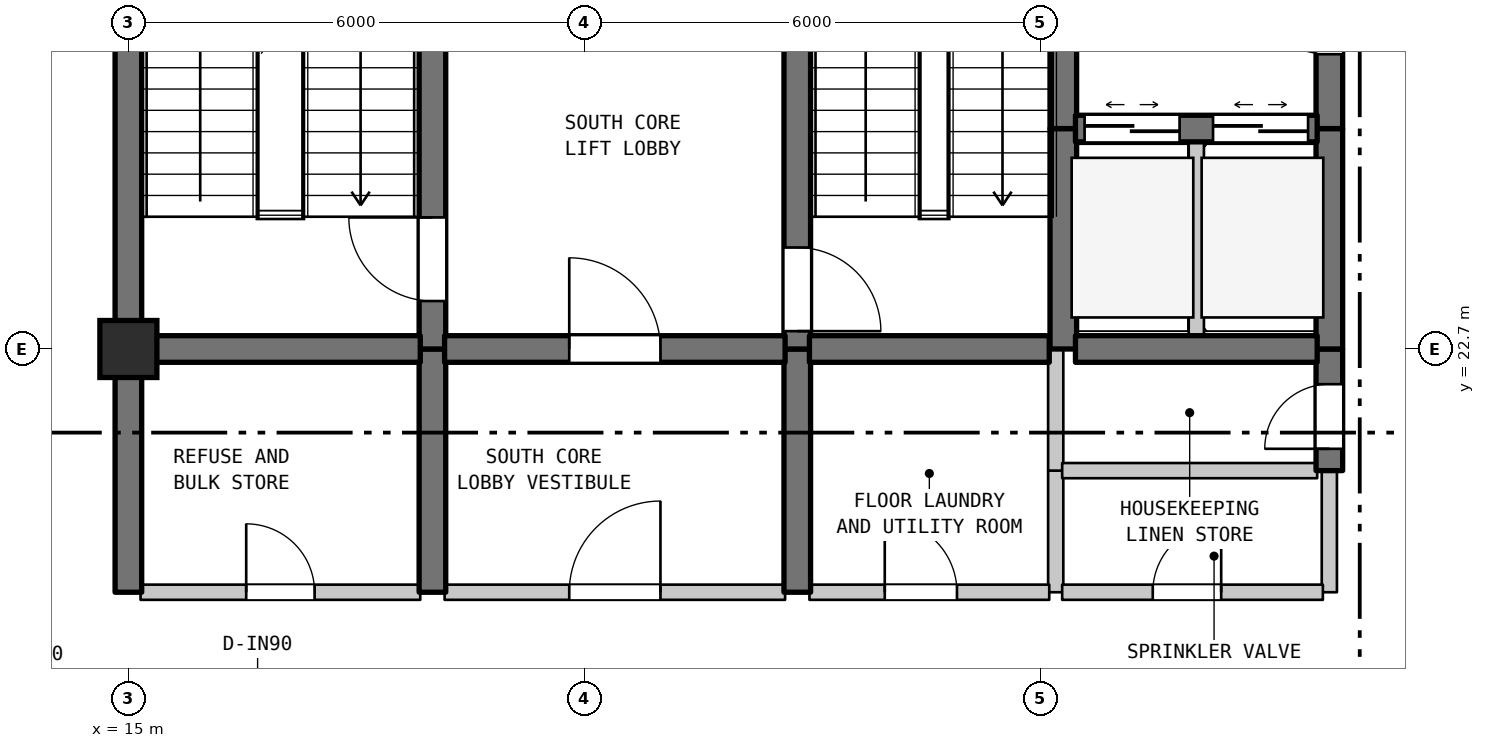
"""IFC4 building model, lengths in metres.
Left out: names, types, materials, properties, quantities, classifications, styles, units other than length and angle.
Written with IfcOpenShell. Run it as: python <this file> out.ifc"""

import sys

from ifc_helpers import new_model, si_unit, direction, frame, frame_2d, origin, origin_2d, place, context, subcontext, project, spatial, rectangle, extrude, element, fill, save


model = new_model("IFC4")
c1 = context("Model", 3, precision=1e-05, world=origin(), true_north=direction((0.0, 1.0)))
c2 = subcontext(c1, "Body", "Model", "MODEL_VIEW")
j1 = project(units=[si_unit("LENGTHUNIT", "METRE"), si_unit("PLANEANGLEUNIT", "RADIAN")], contexts=[c1])
p1 = place(None, origin())
s1 = spatial("IfcSite", under=j1, at=p1, CompositionType="ELEMENT")
p2 = place(p1, origin())
s2 = spatial("IfcBuilding", under=s1, at=p2, CompositionType="ELEMENT")
p3 = place(p2, frame((0.0, 0.0, 206.9)))
s3 = spatial("IfcBuildingStorey", under=s2, at=p3, CompositionType="ELEMENT", Elevation=206.9)
p4 = place(p3, frame((15.0, 22.7, 0.0), z_axis=(0.0, 0.0, 1.0), x_axis=(1.0, 0.0, 0.0)))
e1 = element("IfcColumn", 1, at=p4, inside=s3, PredefinedType="COLUMN", context=c2, shape_type="SweptSolid", body=[
    extrude(rectangle(XDim=0.75, YDim=0.75, at=origin_2d()), origin(), (0.0, 0.0, 1.0), 3.7),
])
p5 = place(p3, frame((15.0, 19.5, 0.0), z_axis=(0.0, 0.0, 1.0), x_axis=(0.0, 1.0, 0.0)))
e2 = element("IfcWall", 2, at=p5, inside=s3, PredefinedType="SHEAR", context=c2, shape_type="SweptSolid", body=[
    extrude(rectangle(XDim=3.2, YDim=0.35, at=frame_2d((1.6, 0.0))), origin(), (0.0, 0.0, 1.0), 3.39),
])
p6 = place(p3, frame((15.0, 22.7, 0.0), z_axis=(0.0, 0.0, 1.0), x_axis=(0.0, 1.0, 0.0)))
e3 = element("IfcWall", 3, at=p6, inside=s3, PredefinedType="SHEAR", context=c2, shape_type="SweptSolid", body=[
    extrude(rectangle(XDim=6.8, YDim=0.35, at=frame_2d((3.4, 0.0))), origin(), (0.0, 0.0, 1.0), 3.39),
])
p7 = place(p3, frame((19.0, 19.5, 0.0), z_axis=(0.0, 0.0, 1.0), x_axis=(0.0, 1.0, 0.0)))
e4 = element("IfcWall", 4, at=p7, inside=s3, PredefinedType="SHEAR", context=c2, shape_type="SweptSolid", body=[
    extrude(rectangle(XDim=3.2, YDim=0.35, at=frame_2d((1.6, 0.0))), origin(), (0.0, 0.0, 1.0), 3.39),
])
p8 = place(p3, frame((19.0, 22.7, 0.0), z_axis=(0.0, 0.0, 1.0), x_axis=(0.0, 1.0, 0.0)))
e5 = element("IfcWall", 5, at=p8, inside=s3, PredefinedType="SHEAR", context=c2, shape_type="SweptSolid", body=[
    extrude(rectangle(XDim=5.5, YDim=0.35, at=frame_2d((2.75, 0.0))), origin(), (0.0, 0.0, 1.0), 3.39),
])
p9 = place(p8, frame((0.631, 0.0, 0.0)))
e6 = element("IfcOpeningElement", 6, at=p9, cuts=e5, PredefinedType="OPENING", context=c2, shape_type="SweptSolid", body=[
    extrude(rectangle(XDim=1.1, YDim=2.15, at=frame_2d((0.55, 1.075))), frame((0.0, 0.185, 0.0), z_axis=(0.0, -1.0, 0.0), x_axis=(1.0, 0.0, 0.0)), (0.0, 0.0, 1.0), 0.37),
])
p10 = place(p3, frame((23.8, 19.5, 0.0), z_axis=(0.0, 0.0, 1.0), x_axis=(0.0, 1.0, 0.0)))
e7 = element("IfcWall", 7, at=p10, inside=s3, PredefinedType="SHEAR", context=c2, shape_type="SweptSolid", body=[
    extrude(rectangle(XDim=3.2, YDim=0.35, at=frame_2d((1.6, 0.0))), origin(), (0.0, 0.0, 1.0), 3.39),
])
p11 = place(p3, frame((23.8, 22.7, 0.0), z_axis=(0.0, 0.0, 1.0), x_axis=(0.0, 1.0, 0.0)))
e8 = element("IfcWall", 8, at=p11, inside=s3, PredefinedType="SHEAR", context=c2, shape_type="SweptSolid", body=[
    extrude(rectangle(XDim=5.5, YDim=0.35, at=frame_2d((2.75, 0.0))), origin(), (0.0, 0.0, 1.0), 3.39),
])
p12 = place(p11, frame((0.235, 0.0, 0.0)))
e9 = element("IfcOpeningElement", 9, at=p12, cuts=e8, PredefinedType="OPENING", context=c2, shape_type="SweptSolid", body=[
    extrude(rectangle(XDim=1.1, YDim=2.15, at=frame_2d((0.55, 1.075))), frame((0.0, 0.185, 0.0), z_axis=(0.0, -1.0, 0.0), x_axis=(1.0, 0.0, 0.0)), (0.0, 0.0, 1.0), 0.37),
])
p13 = place(p3, frame((27.2, 19.5, 0.0), z_axis=(0.0, 0.0, 1.0), x_axis=(0.0, 1.0, 0.0)))
e10 = element("IfcWall", 10, at=p13, inside=s3, PredefinedType="STANDARD", context=c2, shape_type="SweptSolid", body=[
    extrude(rectangle(XDim=1.6, YDim=0.2, at=frame_2d((0.8, 0.0))), origin(), (0.0, 0.0, 1.0), 3.39),
])
p14 = place(p3, frame((27.2, 21.1, 0.0), z_axis=(0.0, 0.0, 1.0), x_axis=(0.0, 1.0, 0.0)))
e11 = element("IfcWall", 11, at=p14, inside=s3, PredefinedType="STANDARD", context=c2, shape_type="SweptSolid", body=[
    extrude(rectangle(XDim=1.6, YDim=0.2, at=frame_2d((0.8, 0.0))), origin(), (0.0, 0.0, 1.0), 3.39),
])
p15 = place(p3, frame((27.3, 22.7, 0.0), z_axis=(0.0, 0.0, 1.0), x_axis=(0.0, 1.0, 0.0)))
e12 = element("IfcWall", 12, at=p15, inside=s3, PredefinedType="SHEAR", context=c2, shape_type="SweptSolid", body=[
    extrude(rectangle(XDim=2.9, YDim=0.35, at=frame_2d((1.45, 0.0))), origin(), (0.0, 0.0, 1.0), 3.39),
])
p16 = place(p3, frame((27.3, 25.6, 0.0), z_axis=(0.0, 0.0, 1.0), x_axis=(0.0, 1.0, 0.0)))
e13 = element("IfcWall", 13, at=p16, inside=s3, PredefinedType="SHEAR", context=c2, shape_type="SweptSolid", body=[
    extrude(rectangle(XDim=3.3, YDim=0.35, at=frame_2d((1.65, 0.0))), origin(), (0.0, 0.0, 1.0), 3.39),
])
p17 = place(p3, frame((29.05, 22.7, 0.0), z_axis=(0.0, 0.0, 1.0), x_axis=(0.0, 1.0, 0.0)))
e14 = element("IfcWall", 14, at=p17, inside=s3, PredefinedType="STANDARD", context=c2, shape_type="SweptSolid", body=[
    extrude(rectangle(XDim=2.9, YDim=0.2, at=frame_2d((1.45, 0.0))), origin(), (0.0, 0.0, 1.0), 3.39),
])
p18 = place(p3, frame((30.8, 19.5, 0.0), z_axis=(0.0, 0.0, 1.0), x_axis=(0.0, 1.0, 0.0)))
e15 = element("IfcWall", 15, at=p18, inside=s3, PredefinedType="STANDARD", context=c2, shape_type="SweptSolid", body=[
    extrude(rectangle(XDim=1.6, YDim=0.2, at=frame_2d((0.8, 0.0))), origin(), (0.0, 0.0, 1.0), 3.39),
])
p19 = place(p3, frame((30.8, 21.1, 0.0), z_axis=(0.0, 0.0, 1.0), x_axis=(0.0, 1.0, 0.0)))
e16 = element("IfcWall", 16, at=p19, inside=s3, PredefinedType="SHEAR", context=c2, shape_type="SweptSolid", body=[
    extrude(rectangle(XDim=1.6, YDim=0.35, at=frame_2d((0.8, 0.0))), origin(), (0.0, 0.0, 1.0), 3.39),
])
p20 = place(p19, frame((0.287, 0.0, 0.0)))
e17 = element("IfcOpeningElement", 17, at=p20, cuts=e16, PredefinedType="OPENING", context=c2, shape_type="SweptSolid", body=[
    extrude(rectangle(XDim=0.85, YDim=2.1, at=frame_2d((0.425, 1.05))), frame((0.0, 0.185, 0.0), z_axis=(0.0, -1.0, 0.0), x_axis=(1.0, 0.0, 0.0)), (0.0, 0.0, 1.0), 0.37),
])
p21 = place(p3, frame((30.8, 22.7, 0.0), z_axis=(0.0, 0.0, 1.0), x_axis=(0.0, 1.0, 0.0)))
e18 = element("IfcWall", 18, at=p21, inside=s3, PredefinedType="SHEAR", context=c2, shape_type="SweptSolid", body=[
    extrude(rectangle(XDim=2.9, YDim=0.35, at=frame_2d((1.45, 0.0))), origin(), (0.0, 0.0, 1.0), 3.39),
])
p22 = place(p3, frame((30.8, 25.6, 0.0), z_axis=(0.0, 0.0, 1.0), x_axis=(0.0, 1.0, 0.0)))
e19 = element("IfcWall", 19, at=p22, inside=s3, PredefinedType="SHEAR", context=c2, shape_type="SweptSolid", body=[
    extrude(rectangle(XDim=3.3, YDim=0.35, at=frame_2d((1.65, 0.0))), origin(), (0.0, 0.0, 1.0), 3.39),
])
p23 = place(p22, frame((0.978, 0.0, 0.0)))
e20 = element("IfcOpeningElement", 20, at=p23, cuts=e19, PredefinedType="OPENING", context=c2, shape_type="SweptSolid", body=[
    extrude(rectangle(XDim=1.2, YDim=2.2, at=frame_2d((0.6, 1.1))), frame((0.0, 0.185, 0.0), z_axis=(0.0, -1.0, 0.0), x_axis=(1.0, 0.0, 0.0)), (0.0, 0.0, 1.0), 0.37),
])
p24 = place(p3, frame((15.16, 19.5, 0.0), z_axis=(0.0, 0.0, 1.0), x_axis=(1.0, 0.0, 0.0)))
e21 = element("IfcWall", 21, at=p24, inside=s3, PredefinedType="STANDARD", context=c2, shape_type="SweptSolid", body=[
    extrude(rectangle(XDim=3.68, YDim=0.2, at=frame_2d((1.84, 0.0))), origin(), (0.0, 0.0, 1.0), 3.39),
])
p25 = place(p24, frame((1.39, 0.0, 0.0)))
e22 = element("IfcOpeningElement", 22, at=p25, cuts=e21, PredefinedType="OPENING", context=c2, shape_type="SweptSolid", body=[
    extrude(rectangle(XDim=0.9, YDim=2.15, at=frame_2d((0.45, 1.075))), frame((0.0, 0.11, 0.0), z_axis=(0.0, -1.0, 0.0), x_axis=(1.0, 0.0, 0.0)), (0.0, 0.0, 1.0), 0.22),
])
p26 = place(p3, frame((19.16, 19.5, 0.0), z_axis=(0.0, 0.0, 1.0), x_axis=(1.0, 0.0, 0.0)))
e23 = element("IfcWall", 23, at=p26, inside=s3, PredefinedType="STANDARD", context=c2, shape_type="SweptSolid", body=[
    extrude(rectangle(XDim=4.48, YDim=0.2, at=frame_2d((2.24, 0.0))), origin(), (0.0, 0.0, 1.0), 3.39),
])
p27 = place(p26, frame((1.64, 0.0, 0.0)))
e24 = element("IfcOpeningElement", 24, at=p27, cuts=e23, PredefinedType="OPENING", context=c2, shape_type="SweptSolid", body=[
    extrude(rectangle(XDim=1.2, YDim=2.2, at=frame_2d((0.6, 1.1))), frame((0.0, 0.11, 0.0), z_axis=(0.0, -1.0, 0.0), x_axis=(1.0, 0.0, 0.0)), (0.0, 0.0, 1.0), 0.22),
])
p28 = place(p3, frame((23.96, 19.5, 0.0), z_axis=(0.0, 0.0, 1.0), x_axis=(1.0, 0.0, 0.0)))
e25 = element("IfcWall", 25, at=p28, inside=s3, PredefinedType="STANDARD", context=c2, shape_type="SweptSolid", body=[
    extrude(rectangle(XDim=3.155, YDim=0.2, at=frame_2d((1.578, 0.0))), origin(), (0.0, 0.0, 1.0), 3.39),
])
p29 = place(p28, frame((0.991, 0.0, 0.0)))
e26 = element("IfcOpeningElement", 26, at=p29, cuts=e25, PredefinedType="OPENING", context=c2, shape_type="SweptSolid", body=[
    extrude(rectangle(XDim=0.95, YDim=2.15, at=frame_2d((0.475, 1.075))), frame((0.0, 0.11, 0.0), z_axis=(0.0, -1.0, 0.0), x_axis=(1.0, 0.0, 0.0)), (0.0, 0.0, 1.0), 0.22),
])
p30 = place(p3, frame((27.285, 19.5, 0.0), z_axis=(0.0, 0.0, 1.0), x_axis=(1.0, 0.0, 0.0)))
e27 = element("IfcWall", 27, at=p30, inside=s3, PredefinedType="STANDARD", context=c2, shape_type="SweptSolid", body=[
    extrude(rectangle(XDim=3.43, YDim=0.2, at=frame_2d((1.715, 0.0))), origin(), (0.0, 0.0, 1.0), 3.39),
])
p31 = place(p30, frame((1.192, 0.0, 0.0)))
e28 = element("IfcOpeningElement", 28, at=p31, cuts=e27, PredefinedType="OPENING", context=c2, shape_type="SweptSolid", body=[
    extrude(rectangle(XDim=0.9, YDim=2.15, at=frame_2d((0.45, 1.075))), frame((0.0, 0.11, 0.0), z_axis=(0.0, -1.0, 0.0), x_axis=(1.0, 0.0, 0.0)), (0.0, 0.0, 1.0), 0.22),
])
p32 = place(p3, frame((27.285, 21.1, 0.0), z_axis=(0.0, 0.0, 1.0), x_axis=(1.0, 0.0, 0.0)))
e29 = element("IfcWall", 29, at=p32, inside=s3, PredefinedType="STANDARD", context=c2, shape_type="SweptSolid", body=[
    extrude(rectangle(XDim=3.355, YDim=0.2, at=frame_2d((1.677, 0.0))), origin(), (0.0, 0.0, 1.0), 3.39),
])
p33 = place(p3, frame((15.16, 22.7, 0.0), z_axis=(0.0, 0.0, 1.0), x_axis=(1.0, 0.0, 0.0)))
e30 = element("IfcWall", 30, at=p33, inside=s3, PredefinedType="SHEAR", context=c2, shape_type="SweptSolid", body=[
    extrude(rectangle(XDim=3.68, YDim=0.35, at=frame_2d((1.84, 0.0))), origin(), (0.0, 0.0, 1.0), 3.39),
])
p34 = place(p3, frame((19.16, 22.7, 0.0), z_axis=(0.0, 0.0, 1.0), x_axis=(1.0, 0.0, 0.0)))
e31 = element("IfcWall", 31, at=p34, inside=s3, PredefinedType="SHEAR", context=c2, shape_type="SweptSolid", body=[
    extrude(rectangle(XDim=4.48, YDim=0.35, at=frame_2d((2.24, 0.0))), origin(), (0.0, 0.0, 1.0), 3.39),
])
p35 = place(p34, frame((1.64, 0.0, 0.0)))
e32 = element("IfcOpeningElement", 32, at=p35, cuts=e31, PredefinedType="OPENING", context=c2, shape_type="SweptSolid", body=[
    extrude(rectangle(XDim=1.2, YDim=2.2, at=frame_2d((0.6, 1.1))), frame((0.0, 0.185, 0.0), z_axis=(0.0, -1.0, 0.0), x_axis=(1.0, 0.0, 0.0)), (0.0, 0.0, 1.0), 0.37),
])
p36 = place(p3, frame((23.96, 22.7, 0.0), z_axis=(0.0, 0.0, 1.0), x_axis=(1.0, 0.0, 0.0)))
e33 = element("IfcWall", 33, at=p36, inside=s3, PredefinedType="SHEAR", context=c2, shape_type="SweptSolid", body=[
    extrude(rectangle(XDim=3.155, YDim=0.35, at=frame_2d((1.578, 0.0))), origin(), (0.0, 0.0, 1.0), 3.39),
])
p37 = place(p3, frame((27.46, 22.7, 0.0), z_axis=(0.0, 0.0, 1.0), x_axis=(1.0, 0.0, 0.0)))
e34 = element("IfcWall", 34, at=p37, inside=s3, PredefinedType="SHEAR", context=c2, shape_type="SweptSolid", body=[
    extrude(rectangle(XDim=3.18, YDim=0.35, at=frame_2d((1.59, 0.0))), origin(), (0.0, 0.0, 1.0), 3.39),
])
p38 = place(p3, frame((27.46, 25.6, 0.0), z_axis=(0.0, 0.0, 1.0), x_axis=(1.0, 0.0, 0.0)))
e35 = element("IfcWall", 35, at=p38, inside=s3, PredefinedType="SHEAR", context=c2, shape_type="SweptSolid", body=[
    extrude(rectangle(XDim=3.18, YDim=0.35, at=frame_2d((1.59, 0.0))), origin(), (0.0, 0.0, 1.0), 3.39),
])
p39 = place(p38, frame((0.12, 0.0, 0.0)))
e36 = element("IfcOpeningElement", 36, at=p39, cuts=e35, PredefinedType="OPENING", context=c2, shape_type="SweptSolid", body=[
    extrude(rectangle(XDim=1.25, YDim=2.2, at=frame_2d((0.625, 1.1))), frame((0.0, 0.185, 0.0), z_axis=(0.0, -1.0, 0.0), x_axis=(1.0, 0.0, 0.0)), (0.0, 0.0, 1.0), 0.37),
])
p40 = place(p38, frame((1.81, 0.0, 0.0)))
e37 = element("IfcOpeningElement", 37, at=p40, cuts=e35, PredefinedType="OPENING", context=c2, shape_type="SweptSolid", body=[
    extrude(rectangle(XDim=1.25, YDim=2.2, at=frame_2d((0.625, 1.1))), frame((0.0, 0.185, 0.0), z_axis=(0.0, -1.0, 0.0), x_axis=(1.0, 0.0, 0.0)), (0.0, 0.0, 1.0), 0.37),
])
p41 = place(p9, origin())
e38 = element("IfcDoor", 38, at=p41, inside=s3, OperationType="SINGLE_SWING_RIGHT", PredefinedType="DOOR", context=c2, shape_type="SweptSolid", body=[
    extrude(rectangle(XDim=1.1, YDim=2.15, at=frame_2d((0.55, 1.075))), frame((0.0, 0.025, 0.0), z_axis=(0.0, -1.0, 0.0), x_axis=(1.0, 0.0, 0.0)), (0.0, 0.0, 1.0), 0.05),
])
fill(e6, e38)
p42 = place(p12, frame((1.1, 0.0, 0.0), z_axis=(0.0, 0.0, 1.0), x_axis=(-1.0, 0.0, 0.0)))
e39 = element("IfcDoor", 39, at=p42, inside=s3, OperationType="SINGLE_SWING_LEFT", PredefinedType="DOOR", context=c2, shape_type="SweptSolid", body=[
    extrude(rectangle(XDim=1.1, YDim=2.15, at=frame_2d((0.55, 1.075))), frame((0.0, 0.025, 0.0), z_axis=(0.0, -1.0, 0.0), x_axis=(1.0, 0.0, 0.0)), (0.0, 0.0, 1.0), 0.05),
])
fill(e9, e39)
p43 = place(p20, origin())
e40 = element("IfcDoor", 40, at=p43, inside=s3, OperationType="SINGLE_SWING_LEFT", PredefinedType="DOOR", context=c2, shape_type="SweptSolid", body=[
    extrude(rectangle(XDim=0.85, YDim=2.1, at=frame_2d((0.425, 1.05))), frame((0.0, 0.025, 0.0), z_axis=(0.0, -1.0, 0.0), x_axis=(1.0, 0.0, 0.0)), (0.0, 0.0, 1.0), 0.05),
])
fill(e17, e40)
p44 = place(p23, origin())
e41 = element("IfcDoor", 41, at=p44, inside=s3, OperationType="SINGLE_SWING_RIGHT", PredefinedType="DOOR", context=c2, shape_type="SweptSolid", body=[
    extrude(rectangle(XDim=1.2, YDim=2.2, at=frame_2d((0.6, 1.1))), frame((0.0, 0.025, 0.0), z_axis=(0.0, -1.0, 0.0), x_axis=(1.0, 0.0, 0.0)), (0.0, 0.0, 1.0), 0.05),
])
fill(e20, e41)
p45 = place(p25, origin())
e42 = element("IfcDoor", 42, at=p45, inside=s3, OperationType="SINGLE_SWING_LEFT", PredefinedType="DOOR", context=c2, shape_type="SweptSolid", body=[
    extrude(rectangle(XDim=0.9, YDim=2.15, at=frame_2d((0.45, 1.075))), frame((0.0, 0.025, 0.0), z_axis=(0.0, -1.0, 0.0), x_axis=(1.0, 0.0, 0.0)), (0.0, 0.0, 1.0), 0.05),
])
fill(e22, e42)
p46 = place(p27, origin())
e43 = element("IfcDoor", 43, at=p46, inside=s3, OperationType="SINGLE_SWING_RIGHT", PredefinedType="DOOR", context=c2, shape_type="SweptSolid", body=[
    extrude(rectangle(XDim=1.2, YDim=2.2, at=frame_2d((0.6, 1.1))), frame((0.0, 0.025, 0.0), z_axis=(0.0, -1.0, 0.0), x_axis=(1.0, 0.0, 0.0)), (0.0, 0.0, 1.0), 0.05),
])
fill(e24, e43)
p47 = place(p29, origin())
e44 = element("IfcDoor", 44, at=p47, inside=s3, OperationType="SINGLE_SWING_LEFT", PredefinedType="DOOR", context=c2, shape_type="SweptSolid", body=[
    extrude(rectangle(XDim=0.95, YDim=2.15, at=frame_2d((0.475, 1.075))), frame((0.0, 0.025, 0.0), z_axis=(0.0, -1.0, 0.0), x_axis=(1.0, 0.0, 0.0)), (0.0, 0.0, 1.0), 0.05),
])
fill(e26, e44)
p48 = place(p31, origin())
e45 = element("IfcDoor", 45, at=p48, inside=s3, OperationType="SINGLE_SWING_RIGHT", PredefinedType="DOOR", context=c2, shape_type="SweptSolid", body=[
    extrude(rectangle(XDim=0.9, YDim=2.15, at=frame_2d((0.45, 1.075))), frame((0.0, 0.025, 0.0), z_axis=(0.0, -1.0, 0.0), x_axis=(1.0, 0.0, 0.0)), (0.0, 0.0, 1.0), 0.05),
])
fill(e28, e45)
p49 = place(p35, origin())
e46 = element("IfcDoor", 46, at=p49, inside=s3, OperationType="SINGLE_SWING_LEFT", PredefinedType="DOOR", context=c2, shape_type="SweptSolid", body=[
    extrude(rectangle(XDim=1.2, YDim=2.2, at=frame_2d((0.6, 1.1))), frame((0.0, 0.025, 0.0), z_axis=(0.0, -1.0, 0.0), x_axis=(1.0, 0.0, 0.0)), (0.0, 0.0, 1.0), 0.05),
])
fill(e32, e46)
p50 = place(p39, origin())
e47 = element("IfcDoor", 47, at=p50, inside=s3, OperationType="DOUBLE_DOOR_SLIDING", PredefinedType="DOOR", context=c2, shape_type="SweptSolid", body=[
    extrude(rectangle(XDim=1.25, YDim=2.2, at=frame_2d((0.625, 1.1))), frame((0.0, 0.025, 0.0), z_axis=(0.0, -1.0, 0.0), x_axis=(1.0, 0.0, 0.0)), (0.0, 0.0, 1.0), 0.05),
])
fill(e36, e47)
p51 = place(p40, origin())
e48 = element("IfcDoor", 48, at=p51, inside=s3, OperationType="DOUBLE_DOOR_SLIDING", PredefinedType="DOOR", context=c2, shape_type="SweptSolid", body=[
    extrude(rectangle(XDim=1.25, YDim=2.2, at=frame_2d((0.625, 1.1))), frame((0.0, 0.025, 0.0), z_axis=(0.0, -1.0, 0.0), x_axis=(1.0, 0.0, 0.0)), (0.0, 0.0, 1.0), 0.05),
])
fill(e37, e48)
save(model, sys.argv[1])
